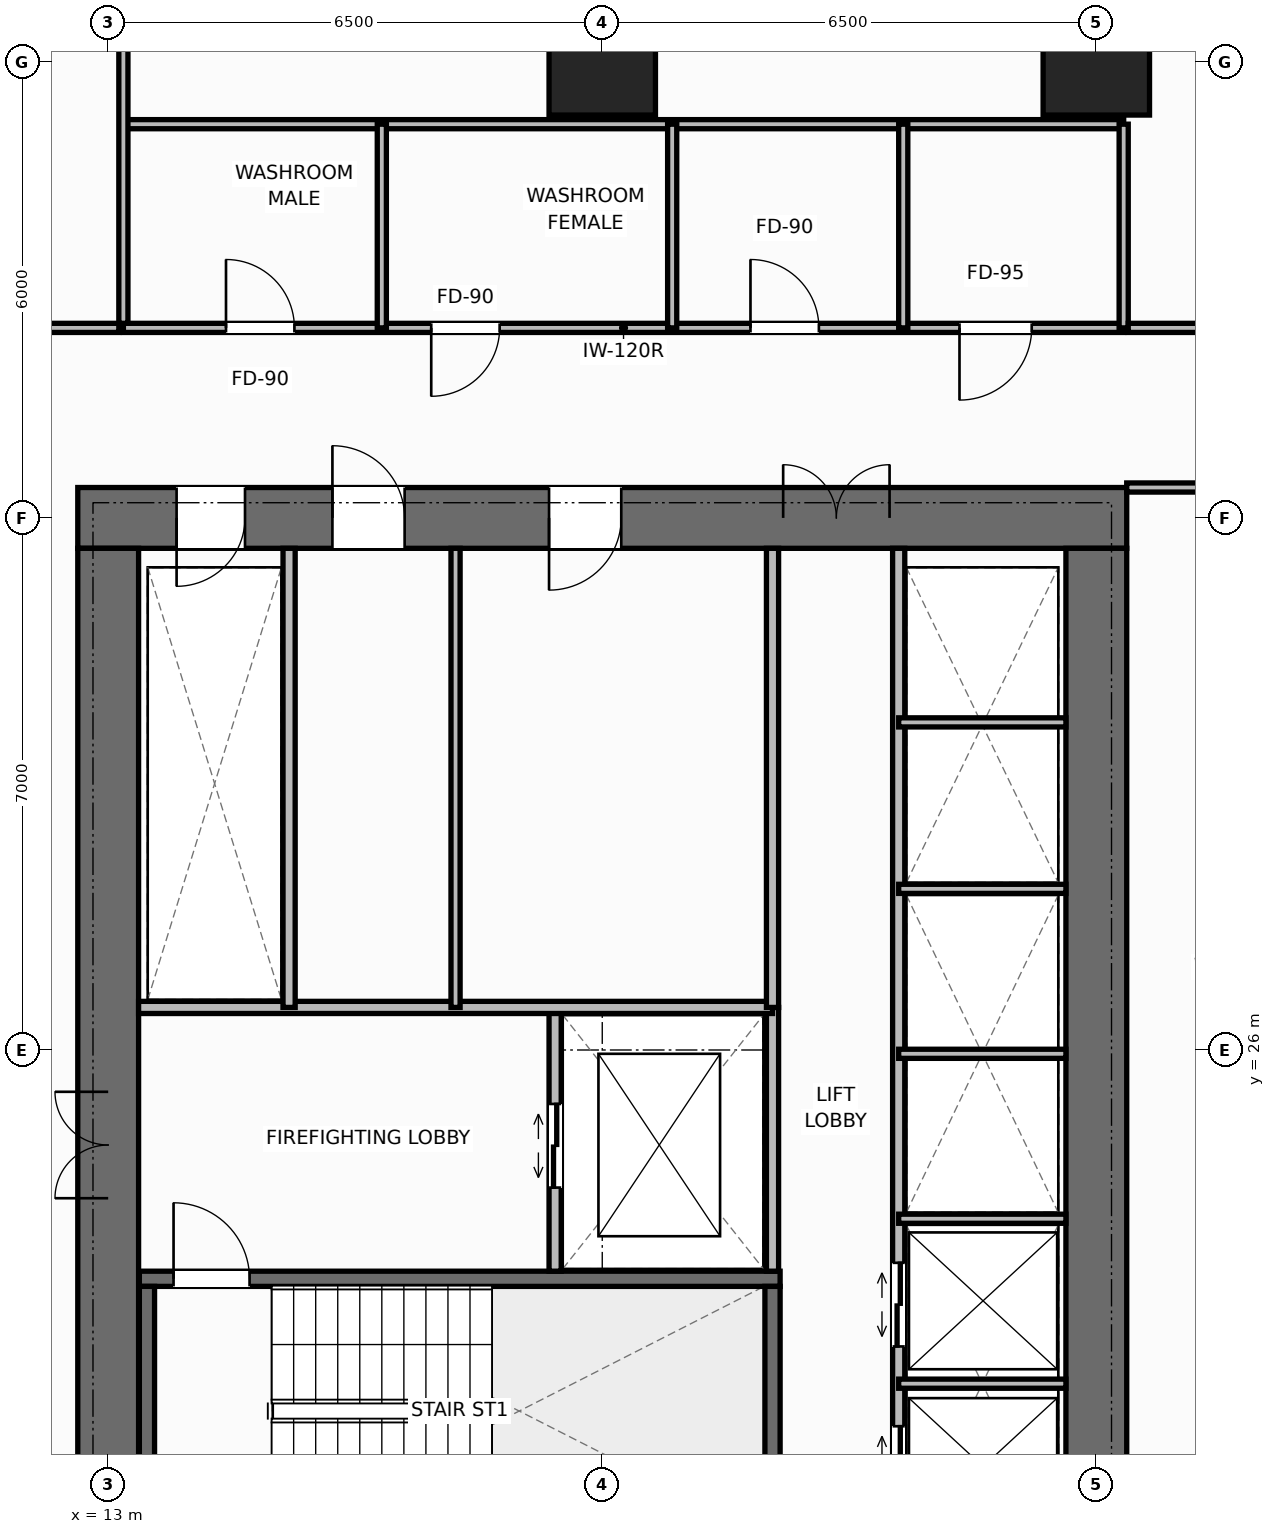
"""IFC4 building model, lengths in metres.
Left out: names, types, materials, properties, quantities, classifications, styles, units other than length and angle.
Written with IfcOpenShell. Run it as: python <this file> out.ifc"""

import sys

from ifc_helpers import new_model, si_unit, direction, frame, frame_2d, origin, origin_2d, place, context, subcontext, project, spatial, rectangle, extrude, element, fill, save


model = new_model("IFC4")
c1 = context("Model", 3, precision=1e-05, world=origin(), true_north=direction((0.0, 1.0)))
c2 = subcontext(c1, "Body", "Model", "MODEL_VIEW")
j1 = project(units=[si_unit("LENGTHUNIT", "METRE"), si_unit("PLANEANGLEUNIT", "RADIAN")], contexts=[c1])
p1 = place(None, origin())
s1 = spatial("IfcSite", under=j1, at=p1, CompositionType="ELEMENT")
p2 = place(p1, origin())
s2 = spatial("IfcBuilding", under=s1, at=p2, CompositionType="ELEMENT")
p3 = place(p2, frame((0.0, 0.0, 27.8)))
s3 = spatial("IfcBuildingStorey", under=s2, at=p3, CompositionType="ELEMENT", Elevation=27.8)
p4 = place(p3, frame((12.6, 33.0, 0.0), z_axis=(0.0, 0.0, 1.0), x_axis=(1.0, 0.0, 0.0)))
e1 = element("IfcWall", 1, at=p4, inside=s3, PredefinedType="SHEAR", context=c2, shape_type="SweptSolid", body=[
    extrude(rectangle(XDim=13.8, YDim=0.8, at=frame_2d((6.9, 0.0))), origin(), (0.0, 0.0, 1.0), 3.8),
])
p5 = place(p4, frame((1.3, 0.0, 0.0)))
e2 = element("IfcOpeningElement", 2, at=p5, cuts=e1, PredefinedType="OPENING", context=c2, shape_type="SweptSolid", body=[
    extrude(rectangle(XDim=0.9, YDim=2.15, at=frame_2d((0.45, 1.075))), frame((0.0, 0.41, 0.0), z_axis=(0.0, -1.0, 0.0), x_axis=(1.0, 0.0, 0.0)), (0.0, 0.0, 1.0), 0.82),
])
p6 = place(p4, frame((3.35, 0.0, 0.0)))
e3 = element("IfcOpeningElement", 3, at=p6, cuts=e1, PredefinedType="OPENING", context=c2, shape_type="SweptSolid", body=[
    extrude(rectangle(XDim=0.95, YDim=2.15, at=frame_2d((0.475, 1.075))), frame((0.0, 0.41, 0.0), z_axis=(0.0, -1.0, 0.0), x_axis=(1.0, 0.0, 0.0)), (0.0, 0.0, 1.0), 0.82),
])
p7 = place(p4, frame((6.2, 0.0, 0.0)))
e4 = element("IfcOpeningElement", 4, at=p7, cuts=e1, PredefinedType="OPENING", context=c2, shape_type="SweptSolid", body=[
    extrude(rectangle(XDim=0.95, YDim=2.15, at=frame_2d((0.475, 1.075))), frame((0.0, 0.41, 0.0), z_axis=(0.0, -1.0, 0.0), x_axis=(1.0, 0.0, 0.0)), (0.0, 0.0, 1.0), 0.82),
])
p8 = place(p4, frame((9.28, 0.0, 0.0)))
e5 = element("IfcOpeningElement", 5, at=p8, cuts=e1, PredefinedType="OPENING", context=c2, shape_type="SweptSolid", body=[
    extrude(rectangle(XDim=1.4, YDim=2.2, at=frame_2d((0.7, 1.1))), frame((0.0, 0.41, 0.0), z_axis=(0.0, -1.0, 0.0), x_axis=(1.0, 0.0, 0.0)), (0.0, 0.0, 1.0), 0.82),
])
p9 = place(p3, frame((13.0, 19.4, 0.0), z_axis=(0.0, 0.0, 1.0), x_axis=(0.0, 1.0, 0.0)))
e6 = element("IfcWall", 6, at=p9, inside=s3, PredefinedType="SHEAR", context=c2, shape_type="SweptSolid", body=[
    extrude(rectangle(XDim=13.2, YDim=0.8, at=frame_2d((6.6, 0.0))), origin(), (0.0, 0.0, 1.0), 3.8),
])
p10 = place(p9, frame((4.65, 0.0, 0.0)))
e7 = element("IfcOpeningElement", 7, at=p10, cuts=e6, PredefinedType="OPENING", context=c2, shape_type="SweptSolid", body=[
    extrude(rectangle(XDim=1.4, YDim=2.2, at=frame_2d((0.7, 1.1))), frame((0.0, 0.41, 0.0), z_axis=(0.0, -1.0, 0.0), x_axis=(1.0, 0.0, 0.0)), (0.0, 0.0, 1.0), 0.82),
])
p11 = place(p3, frame((26.0, 19.4, 0.0), z_axis=(0.0, 0.0, 1.0), x_axis=(0.0, 1.0, 0.0)))
e8 = element("IfcWall", 8, at=p11, inside=s3, PredefinedType="SHEAR", context=c2, shape_type="SweptSolid", body=[
    extrude(rectangle(XDim=13.2, YDim=0.8, at=frame_2d((6.6, 0.0))), origin(), (0.0, 0.0, 1.0), 3.8),
])
p12 = place(p3, frame((13.41, 22.99, 0.0), z_axis=(0.0, 0.0, 1.0), x_axis=(1.0, 0.0, 0.0)))
e9 = element("IfcWall", 9, at=p12, inside=s3, PredefinedType="SHEAR", context=c2, shape_type="SweptSolid", body=[
    extrude(rectangle(XDim=8.43, YDim=0.2, at=frame_2d((4.215, 0.0))), origin(), (0.0, 0.0, 1.0), 3.8),
])
p13 = place(p12, frame((0.45, 0.0, 0.0)))
e10 = element("IfcOpeningElement", 10, at=p13, cuts=e9, PredefinedType="OPENING", context=c2, shape_type="SweptSolid", body=[
    extrude(rectangle(XDim=1.0, YDim=2.15, at=frame_2d((0.5, 1.075))), frame((0.0, 0.11, 0.0), z_axis=(0.0, -1.0, 0.0), x_axis=(1.0, 0.0, 0.0)), (0.0, 0.0, 1.0), 0.22),
])
for number, where, z_axis, x_axis in (
    (11, (13.51, 19.61, 0.0), (0.0, 0.0, 1.0), (0.0, 1.0, 0.0)),
    (12, (21.74, 19.61, 0.0), (0.0, 0.0, 1.0), (0.0, 1.0, 0.0)),
):
    element("IfcWall", number, at=place(p3, frame(where, z_axis=z_axis, x_axis=x_axis)), inside=s3, PredefinedType="SHEAR", context=c2, shape_type="SweptSolid", body=[
        extrude(rectangle(XDim=3.28, YDim=0.2, at=frame_2d((1.64, 0.0))), origin(), (0.0, 0.0, 1.0), 3.8),
    ])
for number, where, z_axis, x_axis in (
    (13, (19.5, 39.0, 0.0), (0.0, 0.0, 1.0), (1.0, 0.0, 0.0)),
    (14, (26.0, 39.0, 0.0), (0.0, 0.0, 1.0), (1.0, 0.0, 0.0)),
):
    element("IfcColumn", number, at=place(p3, frame(where, z_axis=z_axis, x_axis=x_axis)), inside=s3, PredefinedType="COLUMN", context=c2, shape_type="SweptSolid", body=[
        extrude(rectangle(XDim=1.4, YDim=1.4, at=origin_2d()), origin(), (0.0, 0.0, 1.0), 3.8),
    ])
p14 = place(p3, frame((21.74, 23.09, 0.0), z_axis=(0.0, 0.0, 1.0), x_axis=(0.0, 1.0, 0.0)))
e15 = element("IfcWall", 15, at=p14, inside=s3, PredefinedType="STANDARD", context=c2, shape_type="SweptSolid", body=[
    extrude(rectangle(XDim=3.47, YDim=0.16, at=frame_2d((1.735, 0.0))), origin(), (0.0, 0.0, 1.0), 3.55),
])
p15 = place(p3, frame((18.88, 23.09, 0.0), z_axis=(0.0, 0.0, 1.0), x_axis=(0.0, 1.0, 0.0)))
e16 = element("IfcWall", 16, at=p15, inside=s3, PredefinedType="STANDARD", context=c2, shape_type="SweptSolid", body=[
    extrude(rectangle(XDim=3.47, YDim=0.16, at=frame_2d((1.735, 0.0))), origin(), (0.0, 0.0, 1.0), 3.55),
])
p16 = place(p15, frame((1.1, 0.0, 0.0)))
e17 = element("IfcOpeningElement", 17, at=p16, cuts=e16, PredefinedType="OPENING", context=c2, shape_type="SweptSolid", body=[
    extrude(rectangle(XDim=1.1, YDim=2.2, at=frame_2d((0.55, 1.1))), frame((0.0, 0.09, 0.0), z_axis=(0.0, -1.0, 0.0), x_axis=(1.0, 0.0, 0.0)), (0.0, 0.0, 1.0), 0.18),
])
p17 = place(p3, frame((13.4, 26.56, 0.0), z_axis=(0.0, 0.0, 1.0), x_axis=(1.0, 0.0, 0.0)))
e18 = element("IfcWall", 18, at=p17, inside=s3, PredefinedType="STANDARD", context=c2, shape_type="SweptSolid", body=[
    extrude(rectangle(XDim=8.34, YDim=0.16, at=frame_2d((4.17, 0.0))), origin(), (0.0, 0.0, 1.0), 3.55),
])
p18 = place(p3, frame((15.38, 26.56, 0.0), z_axis=(0.0, 0.0, 1.0), x_axis=(0.0, 1.0, 0.0)))
e19 = element("IfcWall", 19, at=p18, inside=s3, PredefinedType="STANDARD", context=c2, shape_type="SweptSolid", body=[
    extrude(rectangle(XDim=6.04, YDim=0.16, at=frame_2d((3.02, 0.0))), origin(), (0.0, 0.0, 1.0), 3.55),
])
p19 = place(p3, frame((17.57, 26.56, 0.0), z_axis=(0.0, 0.0, 1.0), x_axis=(0.0, 1.0, 0.0)))
e20 = element("IfcWall", 20, at=p19, inside=s3, PredefinedType="PARTITIONING", context=c2, shape_type="SweptSolid", body=[
    extrude(rectangle(XDim=6.04, YDim=0.12, at=frame_2d((3.02, 0.0))), origin(), (0.0, 0.0, 1.0), 3.55),
])
p20 = place(p3, frame((21.74, 26.56, 0.0), z_axis=(0.0, 0.0, 1.0), x_axis=(0.0, 1.0, 0.0)))
e21 = element("IfcWall", 21, at=p20, inside=s3, PredefinedType="STANDARD", context=c2, shape_type="SweptSolid", body=[
    extrude(rectangle(XDim=6.04, YDim=0.16, at=frame_2d((3.02, 0.0))), origin(), (0.0, 0.0, 1.0), 3.55),
])
p21 = place(p3, frame((23.4, 19.4, 0.0), z_axis=(0.0, 0.0, 1.0), x_axis=(0.0, 1.0, 0.0)))
e22 = element("IfcWall", 22, at=p21, inside=s3, PredefinedType="STANDARD", context=c2, shape_type="SweptSolid", body=[
    extrude(rectangle(XDim=13.2, YDim=0.16, at=frame_2d((6.6, 0.0))), origin(), (0.0, 0.0, 1.0), 3.55),
])
p22 = place(p21, frame((0.55, 0.0, 0.0)))
e23 = element("IfcOpeningElement", 23, at=p22, cuts=e22, PredefinedType="OPENING", context=c2, shape_type="SweptSolid", body=[
    extrude(rectangle(XDim=1.1, YDim=2.2, at=frame_2d((0.55, 1.1))), frame((0.0, 0.09, 0.0), z_axis=(0.0, -1.0, 0.0), x_axis=(1.0, 0.0, 0.0)), (0.0, 0.0, 1.0), 0.18),
])
p23 = place(p21, frame((2.7, 0.0, 0.0)))
e24 = element("IfcOpeningElement", 24, at=p23, cuts=e22, PredefinedType="OPENING", context=c2, shape_type="SweptSolid", body=[
    extrude(rectangle(XDim=1.1, YDim=2.2, at=frame_2d((0.55, 1.1))), frame((0.0, 0.09, 0.0), z_axis=(0.0, -1.0, 0.0), x_axis=(1.0, 0.0, 0.0)), (0.0, 0.0, 1.0), 0.18),
])
for number, where, z_axis, x_axis in (
    (25, (23.4, 21.61, 0.0), (0.0, 0.0, 1.0), (1.0, 0.0, 0.0)),
    (26, (23.4, 23.78, 0.0), (0.0, 0.0, 1.0), (1.0, 0.0, 0.0)),
    (27, (23.4, 25.95, 0.0), (0.0, 0.0, 1.0), (1.0, 0.0, 0.0)),
    (28, (23.4, 28.12, 0.0), (0.0, 0.0, 1.0), (1.0, 0.0, 0.0)),
    (29, (23.4, 30.31, 0.0), (0.0, 0.0, 1.0), (1.0, 0.0, 0.0)),
):
    element("IfcWall", number, at=place(p3, frame(where, z_axis=z_axis, x_axis=x_axis)), inside=s3, PredefinedType="PARTITIONING", context=c2, shape_type="SweptSolid", body=[
        extrude(rectangle(XDim=2.2, YDim=0.12, at=frame_2d((1.1, 0.0))), origin(), (0.0, 0.0, 1.0), 3.55),
    ])
p24 = place(p3, frame((26.4, 33.4, 0.0), z_axis=(0.0, 0.0, 1.0), x_axis=(1.0, 0.0, 0.0)))
e30 = element("IfcWall", 30, at=p24, inside=s3, PredefinedType="PARTITIONING", context=c2, shape_type="SweptSolid", body=[
    extrude(rectangle(XDim=3.6, YDim=0.12, at=frame_2d((1.8, 0.0))), origin(), (0.0, 0.0, 1.0), 3.55),
])
p25 = place(p3, frame((13.2, 35.5, 0.0), z_axis=(0.0, 0.0, 1.0), x_axis=(1.0, 0.0, 0.0)))
e31 = element("IfcWall", 31, at=p25, inside=s3, PredefinedType="PARTITIONING", context=c2, shape_type="SweptSolid", body=[
    extrude(rectangle(XDim=13.16, YDim=0.12, at=frame_2d((6.58, 0.0))), origin(), (0.0, 0.0, 1.0), 3.55),
])
p26 = place(p25, frame((1.35, 0.0, 0.0)))
e32 = element("IfcOpeningElement", 32, at=p26, cuts=e31, PredefinedType="OPENING", context=c2, shape_type="SweptSolid", body=[
    extrude(rectangle(XDim=0.9, YDim=2.15, at=frame_2d((0.45, 1.075))), frame((0.0, 0.07, 0.0), z_axis=(0.0, -1.0, 0.0), x_axis=(1.0, 0.0, 0.0)), (0.0, 0.0, 1.0), 0.14),
])
p27 = place(p25, frame((4.05, 0.0, 0.0)))
e33 = element("IfcOpeningElement", 33, at=p27, cuts=e31, PredefinedType="OPENING", context=c2, shape_type="SweptSolid", body=[
    extrude(rectangle(XDim=0.9, YDim=2.15, at=frame_2d((0.45, 1.075))), frame((0.0, 0.07, 0.0), z_axis=(0.0, -1.0, 0.0), x_axis=(1.0, 0.0, 0.0)), (0.0, 0.0, 1.0), 0.14),
])
p28 = place(p25, frame((8.25, 0.0, 0.0)))
e34 = element("IfcOpeningElement", 34, at=p28, cuts=e31, PredefinedType="OPENING", context=c2, shape_type="SweptSolid", body=[
    extrude(rectangle(XDim=0.9, YDim=2.15, at=frame_2d((0.45, 1.075))), frame((0.0, 0.07, 0.0), z_axis=(0.0, -1.0, 0.0), x_axis=(1.0, 0.0, 0.0)), (0.0, 0.0, 1.0), 0.14),
])
p29 = place(p25, frame((11.0, 0.0, 0.0)))
e35 = element("IfcOpeningElement", 35, at=p29, cuts=e31, PredefinedType="OPENING", context=c2, shape_type="SweptSolid", body=[
    extrude(rectangle(XDim=0.95, YDim=2.15, at=frame_2d((0.475, 1.075))), frame((0.0, 0.07, 0.0), z_axis=(0.0, -1.0, 0.0), x_axis=(1.0, 0.0, 0.0)), (0.0, 0.0, 1.0), 0.14),
])
p30 = place(p3, frame((13.2, 38.18, 0.0), z_axis=(0.0, 0.0, 1.0), x_axis=(1.0, 0.0, 0.0)))
e36 = element("IfcWall", 36, at=p30, inside=s3, PredefinedType="PARTITIONING", context=c2, shape_type="SweptSolid", body=[
    extrude(rectangle(XDim=13.16, YDim=0.12, at=frame_2d((6.58, 0.0))), origin(), (0.0, 0.0, 1.0), 3.55),
])
for number, where, z_axis, x_axis in (
    (37, (16.6, 35.5, 0.0), (0.0, 0.0, 1.0), (0.0, 1.0, 0.0)),
    (38, (20.42, 35.5, 0.0), (0.0, 0.0, 1.0), (0.0, 1.0, 0.0)),
    (39, (23.46, 35.5, 0.0), (0.0, 0.0, 1.0), (0.0, 1.0, 0.0)),
    (40, (26.36, 35.5, 0.0), (0.0, 0.0, 1.0), (0.0, 1.0, 0.0)),
):
    element("IfcWall", number, at=place(p3, frame(where, z_axis=z_axis, x_axis=x_axis)), inside=s3, PredefinedType="PARTITIONING", context=c2, shape_type="SweptSolid", body=[
        extrude(rectangle(XDim=2.68, YDim=0.12, at=frame_2d((1.34, 0.0))), origin(), (0.0, 0.0, 1.0), 3.55),
    ])
p31 = place(p3, frame((13.2, 35.56, 0.0), z_axis=(0.0, 0.0, 1.0), x_axis=(0.0, 1.0, 0.0)))
e41 = element("IfcWall", 41, at=p31, inside=s3, PredefinedType="PARTITIONING", context=c2, shape_type="SweptSolid", body=[
    extrude(rectangle(XDim=16.42, YDim=0.12, at=frame_2d((8.21, 0.0))), origin(), (0.0, 0.0, 1.0), 2.9),
])
p32 = place(p3, frame((-0.02, 35.5, 0.0), z_axis=(0.0, 0.0, 1.0), x_axis=(1.0, 0.0, 0.0)))
e42 = element("IfcWall", 42, at=p32, inside=s3, PredefinedType="PARTITIONING", context=c2, shape_type="SweptSolid", body=[
    extrude(rectangle(XDim=13.16, YDim=0.12, at=frame_2d((6.58, 0.0))), origin(), (0.0, 0.0, 1.0), 3.55),
])
p33 = place(p32, frame((10.9, 0.0, 0.0)))
e43 = element("IfcOpeningElement", 43, at=p33, cuts=e42, PredefinedType="OPENING", context=c2, shape_type="SweptSolid", body=[
    extrude(rectangle(XDim=0.95, YDim=2.15, at=frame_2d((0.475, 1.075))), frame((0.0, 0.07, 0.0), z_axis=(0.0, -1.0, 0.0), x_axis=(1.0, 0.0, 0.0)), (0.0, 0.0, 1.0), 0.14),
])
p34 = place(p3, frame((26.42, 35.5, 0.0), z_axis=(0.0, 0.0, 1.0), x_axis=(1.0, 0.0, 0.0)))
e44 = element("IfcWall", 44, at=p34, inside=s3, PredefinedType="PARTITIONING", context=c2, shape_type="SweptSolid", body=[
    extrude(rectangle(XDim=5.92, YDim=0.12, at=frame_2d((2.96, 0.0))), origin(), (0.0, 0.0, 1.0), 3.55),
])
p35 = place(p34, frame((1.776, 0.0, 0.0)))
e45 = element("IfcOpeningElement", 45, at=p35, cuts=e44, PredefinedType="OPENING", context=c2, shape_type="SweptSolid", body=[
    extrude(rectangle(XDim=0.95, YDim=2.15, at=frame_2d((0.475, 1.075))), frame((0.0, 0.07, 0.0), z_axis=(0.0, -1.0, 0.0), x_axis=(1.0, 0.0, 0.0)), (0.0, 0.0, 1.0), 0.14),
])
p36 = place(p13, origin())
e46 = element("IfcDoor", 46, at=p36, inside=s3, OperationType="SINGLE_SWING_LEFT", PredefinedType="DOOR", context=c2, shape_type="SweptSolid", body=[
    extrude(rectangle(XDim=1.0, YDim=2.15, at=frame_2d((0.5, 1.075))), frame((0.0, 0.025, 0.0), z_axis=(0.0, -1.0, 0.0), x_axis=(1.0, 0.0, 0.0)), (0.0, 0.0, 1.0), 0.05),
])
fill(e10, e46)
p37 = place(p10, origin())
e47 = element("IfcDoor", 47, at=p37, inside=s3, OperationType="DOUBLE_DOOR_SINGLE_SWING", PredefinedType="DOOR", context=c2, shape_type="SweptSolid", body=[
    extrude(rectangle(XDim=1.4, YDim=2.2, at=frame_2d((0.7, 1.1))), frame((0.0, 0.025, 0.0), z_axis=(0.0, -1.0, 0.0), x_axis=(1.0, 0.0, 0.0)), (0.0, 0.0, 1.0), 0.05),
])
fill(e7, e47)
p38 = place(p16, origin())
e48 = element("IfcDoor", 48, at=p38, inside=s3, OperationType="DOUBLE_DOOR_SLIDING", PredefinedType="DOOR", context=c2, shape_type="SweptSolid", body=[
    extrude(rectangle(XDim=1.1, YDim=2.2, at=frame_2d((0.55, 1.1))), frame((0.0, 0.025, 0.0), z_axis=(0.0, -1.0, 0.0), x_axis=(1.0, 0.0, 0.0)), (0.0, 0.0, 1.0), 0.05),
])
fill(e17, e48)
p39 = place(p5, origin())
e49 = element("IfcDoor", 49, at=p39, inside=s3, OperationType="SINGLE_SWING_RIGHT", PredefinedType="DOOR", context=c2, shape_type="SweptSolid", body=[
    extrude(rectangle(XDim=0.9, YDim=2.15, at=frame_2d((0.45, 1.075))), frame((0.0, -0.075, 0.0), z_axis=(0.0, -1.0, 0.0), x_axis=(1.0, 0.0, 0.0)), (0.0, 0.0, 1.0), 0.05),
])
fill(e2, e49)
p40 = place(p6, origin())
e50 = element("IfcDoor", 50, at=p40, inside=s3, OperationType="SINGLE_SWING_LEFT", PredefinedType="DOOR", context=c2, shape_type="SweptSolid", body=[
    extrude(rectangle(XDim=0.95, YDim=2.15, at=frame_2d((0.475, 1.075))), frame((0.0, -0.075, 0.0), z_axis=(0.0, -1.0, 0.0), x_axis=(1.0, 0.0, 0.0)), (0.0, 0.0, 1.0), 0.05),
])
fill(e3, e50)
p41 = place(p7, origin())
e51 = element("IfcDoor", 51, at=p41, inside=s3, OperationType="SINGLE_SWING_RIGHT", PredefinedType="DOOR", context=c2, shape_type="SweptSolid", body=[
    extrude(rectangle(XDim=0.95, YDim=2.15, at=frame_2d((0.475, 1.075))), frame((0.0, -0.075, 0.0), z_axis=(0.0, -1.0, 0.0), x_axis=(1.0, 0.0, 0.0)), (0.0, 0.0, 1.0), 0.05),
])
fill(e4, e51)
p42 = place(p8, origin())
e52 = element("IfcDoor", 52, at=p42, inside=s3, OperationType="DOUBLE_DOOR_SINGLE_SWING", PredefinedType="DOOR", context=c2, shape_type="SweptSolid", body=[
    extrude(rectangle(XDim=1.4, YDim=2.2, at=frame_2d((0.7, 1.1))), frame((0.0, -0.075, 0.0), z_axis=(0.0, -1.0, 0.0), x_axis=(1.0, 0.0, 0.0)), (0.0, 0.0, 1.0), 0.05),
])
fill(e5, e52)
p43 = place(p22, origin())
e53 = element("IfcDoor", 53, at=p43, inside=s3, OperationType="DOUBLE_DOOR_SLIDING", PredefinedType="DOOR", context=c2, shape_type="SweptSolid", body=[
    extrude(rectangle(XDim=1.1, YDim=2.2, at=frame_2d((0.55, 1.1))), frame((0.0, 0.025, 0.0), z_axis=(0.0, -1.0, 0.0), x_axis=(1.0, 0.0, 0.0)), (0.0, 0.0, 1.0), 0.05),
])
fill(e23, e53)
p44 = place(p23, origin())
e54 = element("IfcDoor", 54, at=p44, inside=s3, OperationType="DOUBLE_DOOR_SLIDING", PredefinedType="DOOR", context=c2, shape_type="SweptSolid", body=[
    extrude(rectangle(XDim=1.1, YDim=2.2, at=frame_2d((0.55, 1.1))), frame((0.0, 0.025, 0.0), z_axis=(0.0, -1.0, 0.0), x_axis=(1.0, 0.0, 0.0)), (0.0, 0.0, 1.0), 0.05),
])
fill(e24, e54)
p45 = place(p26, origin())
e55 = element("IfcDoor", 55, at=p45, inside=s3, OperationType="SINGLE_SWING_LEFT", PredefinedType="DOOR", context=c2, shape_type="SweptSolid", body=[
    extrude(rectangle(XDim=0.9, YDim=2.15, at=frame_2d((0.45, 1.075))), frame((0.0, 0.025, 0.0), z_axis=(0.0, -1.0, 0.0), x_axis=(1.0, 0.0, 0.0)), (0.0, 0.0, 1.0), 0.05),
])
fill(e32, e55)
p46 = place(p27, origin())
e56 = element("IfcDoor", 56, at=p46, inside=s3, OperationType="SINGLE_SWING_RIGHT", PredefinedType="DOOR", context=c2, shape_type="SweptSolid", body=[
    extrude(rectangle(XDim=0.9, YDim=2.15, at=frame_2d((0.45, 1.075))), frame((0.0, 0.025, 0.0), z_axis=(0.0, -1.0, 0.0), x_axis=(1.0, 0.0, 0.0)), (0.0, 0.0, 1.0), 0.05),
])
fill(e33, e56)
p47 = place(p28, origin())
e57 = element("IfcDoor", 57, at=p47, inside=s3, OperationType="SINGLE_SWING_LEFT", PredefinedType="DOOR", context=c2, shape_type="SweptSolid", body=[
    extrude(rectangle(XDim=0.9, YDim=2.15, at=frame_2d((0.45, 1.075))), frame((0.0, 0.025, 0.0), z_axis=(0.0, -1.0, 0.0), x_axis=(1.0, 0.0, 0.0)), (0.0, 0.0, 1.0), 0.05),
])
fill(e34, e57)
p48 = place(p29, origin())
e58 = element("IfcDoor", 58, at=p48, inside=s3, OperationType="SINGLE_SWING_RIGHT", PredefinedType="DOOR", context=c2, shape_type="SweptSolid", body=[
    extrude(rectangle(XDim=0.95, YDim=2.15, at=frame_2d((0.475, 1.075))), frame((0.0, 0.025, 0.0), z_axis=(0.0, -1.0, 0.0), x_axis=(1.0, 0.0, 0.0)), (0.0, 0.0, 1.0), 0.05),
])
fill(e35, e58)
save(model, sys.argv[1])
